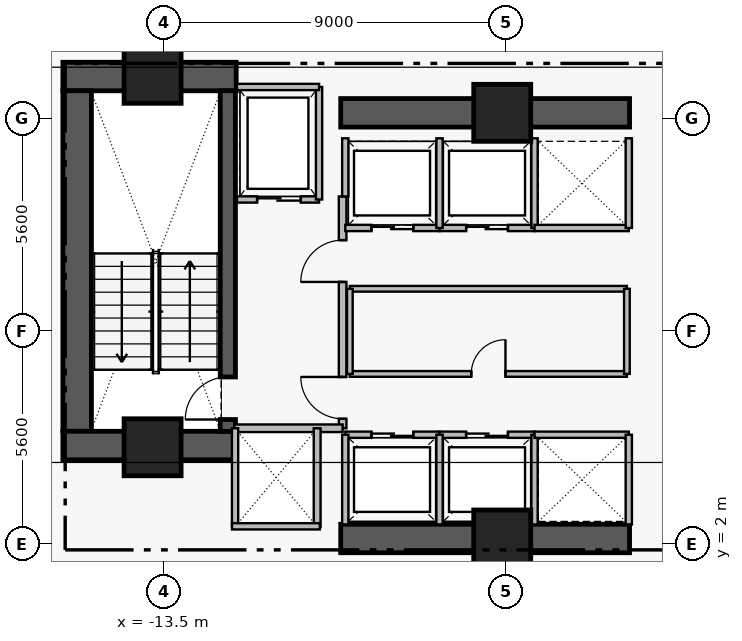
"""IFC4 building model, lengths in metres.
Left out: names, types, materials, properties, quantities, classifications, styles, units other than length and angle.
Written with IfcOpenShell. Run it as: python <this file> out.ifc"""

import sys

from ifc_helpers import new_model, si_unit, direction, frame, frame_2d, origin, origin_2d, place, context, subcontext, project, spatial, rectangle, extrude, element, fill, save


model = new_model("IFC4")
c1 = context("Model", 3, precision=1e-05, world=origin(), true_north=direction((0.0, 1.0)))
c2 = subcontext(c1, "Body", "Model", "MODEL_VIEW")
j1 = project(units=[si_unit("LENGTHUNIT", "METRE"), si_unit("PLANEANGLEUNIT", "RADIAN")], contexts=[c1])
p1 = place(None, origin())
s1 = spatial("IfcSite", under=j1, at=p1, CompositionType="ELEMENT")
p2 = place(p1, origin())
s2 = spatial("IfcBuilding", under=s1, at=p2, CompositionType="ELEMENT")
p3 = place(p2, frame((0.0, 0.0, 150.4)))
s3 = spatial("IfcBuildingStorey", under=s2, at=p3, CompositionType="ELEMENT", Elevation=150.4)
p4 = place(p3, frame((-16.16, 14.305, 0.0), z_axis=(0.0, 0.0, 1.0), x_axis=(1.0, 0.0, 0.0)))
e1 = element("IfcWall", 1, at=p4, inside=s3, PredefinedType="SHEAR", context=c2, shape_type="SweptSolid", body=[
    extrude(rectangle(XDim=4.56, YDim=0.75, at=frame_2d((2.28, 0.0))), origin(), (0.0, 0.0, 1.0), 3.46),
])
p5 = place(p3, frame((-15.785, 4.97, 0.0), z_axis=(0.0, 0.0, 1.0), x_axis=(0.0, 1.0, 0.0)))
e2 = element("IfcWall", 2, at=p5, inside=s3, PredefinedType="SHEAR", context=c2, shape_type="SweptSolid", body=[
    extrude(rectangle(XDim=8.96, YDim=0.75, at=frame_2d((4.48, 0.0))), origin(), (0.0, 0.0, 1.0), 3.46),
])
p6 = place(p3, frame((-16.16, 4.595, 0.0), z_axis=(0.0, 0.0, 1.0), x_axis=(1.0, 0.0, 0.0)))
e3 = element("IfcWall", 3, at=p6, inside=s3, PredefinedType="SHEAR", context=c2, shape_type="SweptSolid", body=[
    extrude(rectangle(XDim=4.56, YDim=0.75, at=frame_2d((2.28, 0.0))), origin(), (0.0, 0.0, 1.0), 3.46),
])
for number, where, z_axis, x_axis in (
    (4, (-8.85, 2.15, 0.0), (0.0, 0.0, 1.0), (1.0, 0.0, 0.0)),
    (5, (-8.85, 13.35, 0.0), (0.0, 0.0, 1.0), (1.0, 0.0, 0.0)),
):
    element("IfcWall", number, at=place(p3, frame(where, z_axis=z_axis, x_axis=x_axis)), inside=s3, PredefinedType="SHEAR", context=c2, shape_type="SweptSolid", body=[
        extrude(rectangle(XDim=7.6, YDim=0.75, at=frame_2d((3.8, 0.0))), origin(), (0.0, 0.0, 1.0), 3.43),
    ])
p7 = place(p3, frame((-11.82, 4.97, 0.0), z_axis=(0.0, 0.0, 1.0), x_axis=(0.0, 1.0, 0.0)))
e6 = element("IfcWall", 6, at=p7, inside=s3, PredefinedType="SHEAR", context=c2, shape_type="SweptSolid", body=[
    extrude(rectangle(XDim=8.96, YDim=0.4, at=frame_2d((4.48, 0.0))), origin(), (0.0, 0.0, 1.0), 3.46),
])
p8 = place(p7, frame((0.31, 0.0, 0.0)))
e7 = element("IfcOpeningElement", 7, at=p8, cuts=e6, PredefinedType="OPENING", context=c2, shape_type="SweptSolid", body=[
    extrude(rectangle(XDim=1.12, YDim=2.22, at=frame_2d((0.56, 1.11))), frame((0.0, 0.21, 0.0), z_axis=(0.0, -1.0, 0.0), x_axis=(1.0, 0.0, 0.0)), (0.0, 0.0, 1.0), 0.42),
])
for number, where, z_axis, x_axis in (
    (8, (-13.8, 14.35, 0.0), (0.0, 0.0, 1.0), (1.0, 0.0, 0.0)),
    (9, (-4.6, 13.35, 0.0), (0.0, 0.0, 1.0), (1.0, 0.0, 0.0)),
    (10, (-13.8, 4.55, 0.0), (0.0, 0.0, 1.0), (1.0, 0.0, 0.0)),
    (11, (-4.6, 2.15, 0.0), (0.0, 0.0, 1.0), (1.0, 0.0, 0.0)),
):
    element("IfcColumn", number, at=place(p3, frame(where, z_axis=z_axis, x_axis=x_axis)), inside=s3, PredefinedType="COLUMN", context=c2, shape_type="SweptSolid", body=[
        extrude(rectangle(XDim=1.5, YDim=1.5, at=origin_2d()), origin(), (0.0, 0.0, 1.0), 3.65),
    ])
p9 = place(p3, frame((-8.8, 5.05, 0.0), z_axis=(0.0, 0.0, 1.0), x_axis=(0.0, 1.0, 0.0)))
e12 = element("IfcWall", 12, at=p9, inside=s3, PredefinedType="PARTITIONING", context=c2, shape_type="SweptSolid", body=[
    extrude(rectangle(XDim=6.1, YDim=0.2, at=frame_2d((3.05, 0.0))), origin(), (0.0, 0.0, 1.0), 3.43),
])
p10 = place(p9, frame((0.25, 0.0, 0.0)))
e13 = element("IfcOpeningElement", 13, at=p10, cuts=e12, PredefinedType="OPENING", context=c2, shape_type="SweptSolid", body=[
    extrude(rectangle(XDim=1.1, YDim=2.2, at=frame_2d((0.55, 1.1))), frame((0.0, 0.11, 0.0), z_axis=(0.0, -1.0, 0.0), x_axis=(1.0, 0.0, 0.0)), (0.0, 0.0, 1.0), 0.22),
])
p11 = place(p9, frame((3.85, 0.0, 0.0)))
e14 = element("IfcOpeningElement", 14, at=p11, cuts=e12, PredefinedType="OPENING", context=c2, shape_type="SweptSolid", body=[
    extrude(rectangle(XDim=1.1, YDim=2.2, at=frame_2d((0.55, 1.1))), frame((0.0, 0.11, 0.0), z_axis=(0.0, -1.0, 0.0), x_axis=(1.0, 0.0, 0.0)), (0.0, 0.0, 1.0), 0.22),
])
p12 = place(p3, frame((-11.58, 11.07, 0.0), z_axis=(0.0, 0.0, 1.0), x_axis=(1.0, 0.0, 0.0)))
e15 = element("IfcWall", 15, at=p12, inside=s3, PredefinedType="PARTITIONING", context=c2, shape_type="SweptSolid", body=[
    extrude(rectangle(XDim=2.16, YDim=0.165, at=frame_2d((1.08, 0.0))), origin(), (0.0, 0.0, 1.0), 3.43),
])
p13 = place(p12, frame((0.53, 0.0, 0.0)))
e16 = element("IfcOpeningElement", 16, at=p13, cuts=e15, PredefinedType="OPENING", context=c2, shape_type="SweptSolid", body=[
    extrude(rectangle(XDim=1.15, YDim=2.25, at=frame_2d((0.575, 1.125))), frame((0.0, 0.093, 0.0), z_axis=(0.0, -1.0, 0.0), x_axis=(1.0, 0.0, 0.0)), (0.0, 0.0, 1.0), 0.185),
])
p14 = place(p3, frame((-8.73, 4.88, 0.0), z_axis=(0.0, 0.0, 1.0), x_axis=(1.0, 0.0, 0.0)))
e17 = element("IfcWall", 17, at=p14, inside=s3, PredefinedType="PARTITIONING", context=c2, shape_type="SweptSolid", body=[
    extrude(rectangle(XDim=2.48, YDim=0.165, at=frame_2d((1.24, 0.0))), origin(), (0.0, 0.0, 1.0), 3.43),
])
p15 = place(p14, frame((0.69, 0.0, 0.0)))
e18 = element("IfcOpeningElement", 18, at=p15, cuts=e17, PredefinedType="OPENING", context=c2, shape_type="SweptSolid", body=[
    extrude(rectangle(XDim=1.1, YDim=2.25, at=frame_2d((0.55, 1.125))), frame((0.0, 0.093, 0.0), z_axis=(0.0, -1.0, 0.0), x_axis=(1.0, 0.0, 0.0)), (0.0, 0.0, 1.0), 0.185),
])
p16 = place(p3, frame((-6.25, 4.88, 0.0), z_axis=(0.0, 0.0, 1.0), x_axis=(1.0, 0.0, 0.0)))
e19 = element("IfcWall", 19, at=p16, inside=s3, PredefinedType="PARTITIONING", context=c2, shape_type="SweptSolid", body=[
    extrude(rectangle(XDim=2.5, YDim=0.165, at=frame_2d((1.25, 0.0))), origin(), (0.0, 0.0, 1.0), 3.43),
])
p17 = place(p16, frame((0.7, 0.0, 0.0)))
e20 = element("IfcOpeningElement", 20, at=p17, cuts=e19, PredefinedType="OPENING", context=c2, shape_type="SweptSolid", body=[
    extrude(rectangle(XDim=1.1, YDim=2.25, at=frame_2d((0.55, 1.125))), frame((0.0, 0.093, 0.0), z_axis=(0.0, -1.0, 0.0), x_axis=(1.0, 0.0, 0.0)), (0.0, 0.0, 1.0), 0.185),
])
p18 = place(p3, frame((-8.73, 10.32, 0.0), z_axis=(0.0, 0.0, 1.0), x_axis=(1.0, 0.0, 0.0)))
e21 = element("IfcWall", 21, at=p18, inside=s3, PredefinedType="PARTITIONING", context=c2, shape_type="SweptSolid", body=[
    extrude(rectangle(XDim=2.48, YDim=0.165, at=frame_2d((1.24, 0.0))), origin(), (0.0, 0.0, 1.0), 3.43),
])
p19 = place(p18, frame((0.69, 0.0, 0.0)))
e22 = element("IfcOpeningElement", 22, at=p19, cuts=e21, PredefinedType="OPENING", context=c2, shape_type="SweptSolid", body=[
    extrude(rectangle(XDim=1.1, YDim=2.25, at=frame_2d((0.55, 1.125))), frame((0.0, 0.093, 0.0), z_axis=(0.0, -1.0, 0.0), x_axis=(1.0, 0.0, 0.0)), (0.0, 0.0, 1.0), 0.185),
])
p20 = place(p3, frame((-6.25, 10.32, 0.0), z_axis=(0.0, 0.0, 1.0), x_axis=(1.0, 0.0, 0.0)))
e23 = element("IfcWall", 23, at=p20, inside=s3, PredefinedType="PARTITIONING", context=c2, shape_type="SweptSolid", body=[
    extrude(rectangle(XDim=2.5, YDim=0.165, at=frame_2d((1.25, 0.0))), origin(), (0.0, 0.0, 1.0), 3.43),
])
p21 = place(p20, frame((0.7, 0.0, 0.0)))
e24 = element("IfcOpeningElement", 24, at=p21, cuts=e23, PredefinedType="OPENING", context=c2, shape_type="SweptSolid", body=[
    extrude(rectangle(XDim=1.1, YDim=2.25, at=frame_2d((0.55, 1.125))), frame((0.0, 0.093, 0.0), z_axis=(0.0, -1.0, 0.0), x_axis=(1.0, 0.0, 0.0)), (0.0, 0.0, 1.0), 0.185),
])
p22 = place(p3, frame((-8.61, 6.48, 0.0), z_axis=(0.0, 0.0, 1.0), x_axis=(1.0, 0.0, 0.0)))
e25 = element("IfcWall", 25, at=p22, inside=s3, PredefinedType="PARTITIONING", context=c2, shape_type="SweptSolid", body=[
    extrude(rectangle(XDim=7.29, YDim=0.15, at=frame_2d((3.645, 0.0))), origin(), (0.0, 0.0, 1.0), 3.43),
])
p23 = place(p22, frame((3.195, 0.0, 0.0)))
e26 = element("IfcOpeningElement", 26, at=p23, cuts=e25, PredefinedType="OPENING", context=c2, shape_type="SweptSolid", body=[
    extrude(rectangle(XDim=0.9, YDim=2.15, at=frame_2d((0.45, 1.075))), frame((0.0, 0.085, 0.0), z_axis=(0.0, -1.0, 0.0), x_axis=(1.0, 0.0, 0.0)), (0.0, 0.0, 1.0), 0.17),
])
p24 = place(p3, frame((-11.65, 5.05, 0.0), z_axis=(0.0, 0.0, 1.0), x_axis=(1.0, 0.0, 0.0)))
e27 = element("IfcWall", 27, at=p24, inside=s3, PredefinedType="PARTITIONING", context=c2, shape_type="SweptSolid", body=[
    extrude(rectangle(XDim=2.85, YDim=0.2, at=frame_2d((1.425, 0.0))), origin(), (0.0, 0.0, 1.0), 3.43),
])
p25 = place(p3, frame((-9.42, 11.07, 0.0), z_axis=(0.0, 0.0, 1.0), x_axis=(0.0, 1.0, 0.0)))
e28 = element("IfcWall", 28, at=p25, inside=s3, PredefinedType="PARTITIONING", context=c2, shape_type="SweptSolid", body=[
    extrude(rectangle(XDim=2.96, YDim=0.165, at=frame_2d((1.48, 0.0))), origin(), (0.0, 0.0, 1.0), 3.43),
])
p26 = place(p3, frame((-11.58, 14.03, 0.0), z_axis=(0.0, 0.0, 1.0), x_axis=(1.0, 0.0, 0.0)))
e29 = element("IfcWall", 29, at=p26, inside=s3, PredefinedType="PARTITIONING", context=c2, shape_type="SweptSolid", body=[
    extrude(rectangle(XDim=2.16, YDim=0.165, at=frame_2d((1.08, 0.0))), origin(), (0.0, 0.0, 1.0), 3.43),
])
for number, where, z_axis, x_axis in (
    (30, (-8.73, 2.52, 0.0), (0.0, 0.0, 1.0), (0.0, 1.0, 0.0)),
    (31, (-6.25, 2.52, 0.0), (0.0, 0.0, 1.0), (0.0, 1.0, 0.0)),
    (32, (-3.75, 2.52, 0.0), (0.0, 0.0, 1.0), (0.0, 1.0, 0.0)),
):
    element("IfcWall", number, at=place(p3, frame(where, z_axis=z_axis, x_axis=x_axis)), inside=s3, PredefinedType="PARTITIONING", context=c2, shape_type="SweptSolid", body=[
        extrude(rectangle(XDim=2.36, YDim=0.165, at=frame_2d((1.18, 0.0))), origin(), (0.0, 0.0, 1.0), 3.43),
    ])
p27 = place(p3, frame((-8.73, 11.15, 0.0), z_axis=(0.0, 0.0, 1.0), x_axis=(0.0, 1.0, 0.0)))
e33 = element("IfcWall", 33, at=p27, inside=s3, PredefinedType="PARTITIONING", context=c2, shape_type="SweptSolid", body=[
    extrude(rectangle(XDim=1.53, YDim=0.165, at=frame_2d((0.765, 0.0))), origin(), (0.0, 0.0, 1.0), 3.43),
])
for number, where, z_axis, x_axis in (
    (34, (-6.25, 10.32, 0.0), (0.0, 0.0, 1.0), (0.0, 1.0, 0.0)),
    (35, (-3.75, 10.32, 0.0), (0.0, 0.0, 1.0), (0.0, 1.0, 0.0)),
):
    element("IfcWall", number, at=place(p3, frame(where, z_axis=z_axis, x_axis=x_axis)), inside=s3, PredefinedType="PARTITIONING", context=c2, shape_type="SweptSolid", body=[
        extrude(rectangle(XDim=2.36, YDim=0.165, at=frame_2d((1.18, 0.0))), origin(), (0.0, 0.0, 1.0), 3.43),
    ])
p28 = place(p3, frame((-3.75, 4.88, 0.0), z_axis=(0.0, 0.0, 1.0), x_axis=(1.0, 0.0, 0.0)))
e36 = element("IfcWall", 36, at=p28, inside=s3, PredefinedType="PARTITIONING", context=c2, shape_type="SweptSolid", body=[
    extrude(rectangle(XDim=2.48, YDim=0.165, at=frame_2d((1.24, 0.0))), origin(), (0.0, 0.0, 1.0), 3.43),
])
p29 = place(p3, frame((-1.27, 2.52, 0.0), z_axis=(0.0, 0.0, 1.0), x_axis=(0.0, 1.0, 0.0)))
e37 = element("IfcWall", 37, at=p29, inside=s3, PredefinedType="PARTITIONING", context=c2, shape_type="SweptSolid", body=[
    extrude(rectangle(XDim=2.36, YDim=0.165, at=frame_2d((1.18, 0.0))), origin(), (0.0, 0.0, 1.0), 3.43),
])
p30 = place(p3, frame((-3.75, 10.32, 0.0), z_axis=(0.0, 0.0, 1.0), x_axis=(1.0, 0.0, 0.0)))
e38 = element("IfcWall", 38, at=p30, inside=s3, PredefinedType="PARTITIONING", context=c2, shape_type="SweptSolid", body=[
    extrude(rectangle(XDim=2.48, YDim=0.165, at=frame_2d((1.24, 0.0))), origin(), (0.0, 0.0, 1.0), 3.43),
])
p31 = place(p3, frame((-1.27, 10.32, 0.0), z_axis=(0.0, 0.0, 1.0), x_axis=(0.0, 1.0, 0.0)))
e39 = element("IfcWall", 39, at=p31, inside=s3, PredefinedType="PARTITIONING", context=c2, shape_type="SweptSolid", body=[
    extrude(rectangle(XDim=2.36, YDim=0.165, at=frame_2d((1.18, 0.0))), origin(), (0.0, 0.0, 1.0), 3.43),
])
p32 = place(p3, frame((-9.47, 2.45, 0.0), z_axis=(0.0, 0.0, 1.0), x_axis=(0.0, 1.0, 0.0)))
e40 = element("IfcWall", 40, at=p32, inside=s3, PredefinedType="PARTITIONING", context=c2, shape_type="SweptSolid", body=[
    extrude(rectangle(XDim=2.6, YDim=0.18, at=frame_2d((1.3, 0.0))), origin(), (0.0, 0.0, 1.0), 3.43),
])
p33 = place(p3, frame((-11.63, 2.47, 0.0), z_axis=(0.0, 0.0, 1.0), x_axis=(0.0, 1.0, 0.0)))
e41 = element("IfcWall", 41, at=p33, inside=s3, PredefinedType="PARTITIONING", context=c2, shape_type="SweptSolid", body=[
    extrude(rectangle(XDim=2.58, YDim=0.165, at=frame_2d((1.29, 0.0))), origin(), (0.0, 0.0, 1.0), 3.43),
])
p34 = place(p3, frame((-11.71, 2.47, 0.0), z_axis=(0.0, 0.0, 1.0), x_axis=(1.0, 0.0, 0.0)))
e42 = element("IfcWall", 42, at=p34, inside=s3, PredefinedType="PARTITIONING", context=c2, shape_type="SweptSolid", body=[
    extrude(rectangle(XDim=2.31, YDim=0.165, at=frame_2d((1.155, 0.0))), origin(), (0.0, 0.0, 1.0), 2.03),
])
p35 = place(p3, frame((-8.61, 8.72, 0.0), z_axis=(0.0, 0.0, 1.0), x_axis=(1.0, 0.0, 0.0)))
e43 = element("IfcWall", 43, at=p35, inside=s3, PredefinedType="PARTITIONING", context=c2, shape_type="SweptSolid", body=[
    extrude(rectangle(XDim=7.29, YDim=0.15, at=frame_2d((3.645, 0.0))), origin(), (0.0, 0.0, 1.0), 3.43),
])
for number, where, z_axis, x_axis in (
    (44, (-8.61, 6.48, 0.0), (0.0, 0.0, 1.0), (0.0, 1.0, 0.0)),
    (45, (-1.32, 6.48, 0.0), (0.0, 0.0, 1.0), (0.0, 1.0, 0.0)),
):
    element("IfcWall", number, at=place(p3, frame(where, z_axis=z_axis, x_axis=x_axis)), inside=s3, PredefinedType="PARTITIONING", context=c2, shape_type="SweptSolid", body=[
        extrude(rectangle(XDim=2.24, YDim=0.15, at=frame_2d((1.12, 0.0))), origin(), (0.0, 0.0, 1.0), 3.43),
    ])
p36 = place(p8, origin())
e46 = element("IfcDoor", 46, at=p36, inside=s3, OperationType="SINGLE_SWING_LEFT", PredefinedType="DOOR", context=c2, shape_type="SweptSolid", body=[
    extrude(rectangle(XDim=1.12, YDim=2.22, at=frame_2d((0.56, 1.11))), frame((0.0, 0.025, 0.0), z_axis=(0.0, -1.0, 0.0), x_axis=(1.0, 0.0, 0.0)), (0.0, 0.0, 1.0), 0.05),
])
fill(e7, e46)
p37 = place(p10, origin())
e47 = element("IfcDoor", 47, at=p37, inside=s3, OperationType="SINGLE_SWING_RIGHT", PredefinedType="DOOR", context=c2, shape_type="SweptSolid", body=[
    extrude(rectangle(XDim=1.1, YDim=2.2, at=frame_2d((0.55, 1.1))), frame((0.0, 0.025, 0.0), z_axis=(0.0, -1.0, 0.0), x_axis=(1.0, 0.0, 0.0)), (0.0, 0.0, 1.0), 0.05),
])
fill(e13, e47)
p38 = place(p11, origin())
e48 = element("IfcDoor", 48, at=p38, inside=s3, OperationType="SINGLE_SWING_LEFT", PredefinedType="DOOR", context=c2, shape_type="SweptSolid", body=[
    extrude(rectangle(XDim=1.1, YDim=2.2, at=frame_2d((0.55, 1.1))), frame((0.0, 0.025, 0.0), z_axis=(0.0, -1.0, 0.0), x_axis=(1.0, 0.0, 0.0)), (0.0, 0.0, 1.0), 0.05),
])
fill(e14, e48)
p39 = place(p13, origin())
e49 = element("IfcDoor", 49, at=p39, inside=s3, OperationType="SLIDING_TO_LEFT", PredefinedType="DOOR", context=c2, shape_type="SweptSolid", body=[
    extrude(rectangle(XDim=1.15, YDim=2.25, at=frame_2d((0.575, 1.125))), frame((0.0, 0.025, 0.0), z_axis=(0.0, -1.0, 0.0), x_axis=(1.0, 0.0, 0.0)), (0.0, 0.0, 1.0), 0.05),
])
fill(e16, e49)
p40 = place(p15, origin())
e50 = element("IfcDoor", 50, at=p40, inside=s3, OperationType="SLIDING_TO_LEFT", PredefinedType="DOOR", context=c2, shape_type="SweptSolid", body=[
    extrude(rectangle(XDim=1.1, YDim=2.25, at=frame_2d((0.55, 1.125))), frame((0.0, 0.025, 0.0), z_axis=(0.0, -1.0, 0.0), x_axis=(1.0, 0.0, 0.0)), (0.0, 0.0, 1.0), 0.05),
])
fill(e18, e50)
p41 = place(p17, origin())
e51 = element("IfcDoor", 51, at=p41, inside=s3, OperationType="SLIDING_TO_LEFT", PredefinedType="DOOR", context=c2, shape_type="SweptSolid", body=[
    extrude(rectangle(XDim=1.1, YDim=2.25, at=frame_2d((0.55, 1.125))), frame((0.0, 0.025, 0.0), z_axis=(0.0, -1.0, 0.0), x_axis=(1.0, 0.0, 0.0)), (0.0, 0.0, 1.0), 0.05),
])
fill(e20, e51)
p42 = place(p19, origin())
e52 = element("IfcDoor", 52, at=p42, inside=s3, OperationType="SLIDING_TO_LEFT", PredefinedType="DOOR", context=c2, shape_type="SweptSolid", body=[
    extrude(rectangle(XDim=1.1, YDim=2.25, at=frame_2d((0.55, 1.125))), frame((0.0, 0.025, 0.0), z_axis=(0.0, -1.0, 0.0), x_axis=(1.0, 0.0, 0.0)), (0.0, 0.0, 1.0), 0.05),
])
fill(e22, e52)
p43 = place(p21, origin())
e53 = element("IfcDoor", 53, at=p43, inside=s3, OperationType="SLIDING_TO_LEFT", PredefinedType="DOOR", context=c2, shape_type="SweptSolid", body=[
    extrude(rectangle(XDim=1.1, YDim=2.25, at=frame_2d((0.55, 1.125))), frame((0.0, 0.025, 0.0), z_axis=(0.0, -1.0, 0.0), x_axis=(1.0, 0.0, 0.0)), (0.0, 0.0, 1.0), 0.05),
])
fill(e24, e53)
p44 = place(p23, origin())
e54 = element("IfcDoor", 54, at=p44, inside=s3, OperationType="SINGLE_SWING_RIGHT", PredefinedType="DOOR", context=c2, shape_type="SweptSolid", body=[
    extrude(rectangle(XDim=0.9, YDim=2.15, at=frame_2d((0.45, 1.075))), frame((0.0, 0.025, 0.0), z_axis=(0.0, -1.0, 0.0), x_axis=(1.0, 0.0, 0.0)), (0.0, 0.0, 1.0), 0.05),
])
fill(e26, e54)
save(model, sys.argv[1])
